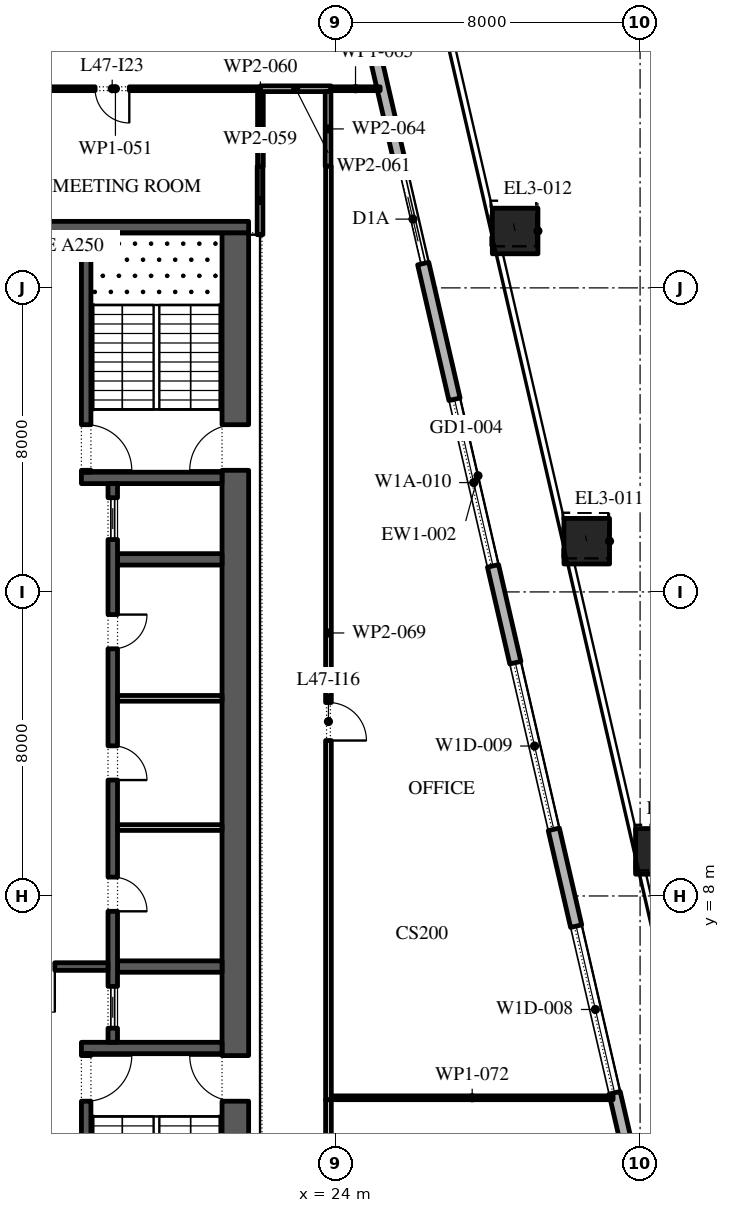
"""IFC4 building model, lengths in metres.
Left out: names, types, materials, properties, quantities, classifications, styles, units other than length and angle.
Written with IfcOpenShell. Run it as: python <this file> out.ifc"""

import sys

from ifc_helpers import new_model, si_unit, direction, frame, frame_2d, origin, origin_2d, place, context, subcontext, project, spatial, rectangle, extrude, element, fill, save


model = new_model("IFC4")
c1 = context("Model", 3, precision=1e-05, world=origin(), true_north=direction((0.0, 1.0)))
c2 = subcontext(c1, "Body", "Model", "MODEL_VIEW")
j1 = project(units=[si_unit("LENGTHUNIT", "METRE"), si_unit("PLANEANGLEUNIT", "RADIAN")], contexts=[c1])
p1 = place(None, origin())
s1 = spatial("IfcSite", under=j1, at=p1, CompositionType="ELEMENT")
p2 = place(p1, origin())
s2 = spatial("IfcBuilding", under=s1, at=p2, CompositionType="ELEMENT")
p3 = place(p2, frame((0.0, 0.0, 213.6)))
s3 = spatial("IfcBuildingStorey", under=s2, at=p3, CompositionType="ELEMENT", Elevation=213.6)
p4 = place(p3, frame((32.481, 9.174, 0.0), z_axis=(-0.005404479485, 0.023361298418, 0.999712479335), x_axis=(-0.974268511785, -0.225390476607, 0.0)))
e1 = element("IfcColumn", 1, at=p4, inside=s3, PredefinedType="COLUMN", context=c2, shape_type="SweptSolid", body=[
    extrude(rectangle(XDim=1.2, YDim=1.2, at=origin_2d()), origin(), (0.0, 0.0, 1.0), 4.201),
])
p5 = place(p3, frame((30.596, 17.335, 0.0), z_axis=(-0.0080747472, 0.035087390713, 0.999351626541), x_axis=(-0.974526982896, -0.224270282488, 0.0)))
e2 = element("IfcColumn", 2, at=p5, inside=s3, PredefinedType="COLUMN", context=c2, shape_type="SweptSolid", body=[
    extrude(rectangle(XDim=1.2, YDim=1.2, at=origin_2d()), origin(), (0.0, 0.0, 1.0), 4.203),
])
p6 = place(p3, frame((28.712, 25.497, 0.0), z_axis=(-0.010741563911, 0.046740318638, 0.998849318675), x_axis=(-0.974594841169, -0.223975211946, 0.0)))
e3 = element("IfcColumn", 3, at=p6, inside=s3, PredefinedType="COLUMN", context=c2, shape_type="SweptSolid", body=[
    extrude(rectangle(XDim=1.2, YDim=1.2, at=origin_2d()), origin(), (0.0, 0.0, 1.0), 4.205),
])
p7 = place(p3, frame((33.157, -5.092, 0.0), z_axis=(0.0, 0.0, 1.0), x_axis=(-0.224950279389, 0.974370243697, 0.0)))
e4 = element("IfcWall", 4, at=p7, inside=s3, PredefinedType="STANDARD", context=c2, shape_type="SweptSolid", body=[
    extrude(rectangle(XDim=49.5, YDim=0.3, at=frame_2d((24.75, 0.0))), origin(), (0.0, 0.0, 1.0), 4.0),
])
p8 = place(p7, frame((2.207, 0.0, 0.0)))
e5 = element("IfcOpeningElement", 5, at=p8, cuts=e4, PredefinedType="OPENING", context=c2, shape_type="SweptSolid", body=[
    extrude(rectangle(XDim=2.4, YDim=3.125, at=frame_2d((1.2, 1.562))), frame((0.0, 0.16, 0.0), z_axis=(0.0, -1.0, 0.0), x_axis=(1.0, 0.0, 0.0)), (0.0, 0.0, 1.0), 0.32),
])
p9 = place(p7, frame((8.121, 0.0, 0.45)))
e6 = element("IfcOpeningElement", 6, at=p9, cuts=e4, PredefinedType="OPENING", context=c2, shape_type="SweptSolid", body=[
    extrude(rectangle(XDim=4.5, YDim=2.875, at=frame_2d((2.25, 1.438))), frame((0.0, 0.16, 0.0), z_axis=(0.0, -1.0, 0.0), x_axis=(1.0, 0.0, 0.0)), (0.0, 0.0, 1.0), 0.32),
])
p10 = place(p7, frame((15.236, 0.0, 0.45)))
e7 = element("IfcOpeningElement", 7, at=p10, cuts=e4, PredefinedType="OPENING", context=c2, shape_type="SweptSolid", body=[
    extrude(rectangle(XDim=4.5, YDim=2.875, at=frame_2d((2.25, 1.438))), frame((0.0, 0.16, 0.0), z_axis=(0.0, -1.0, 0.0), x_axis=(1.0, 0.0, 0.0)), (0.0, 0.0, 1.0), 0.32),
])
p11 = place(p7, frame((22.35, 0.0, 0.45)))
e8 = element("IfcOpeningElement", 8, at=p11, cuts=e4, PredefinedType="OPENING", context=c2, shape_type="SweptSolid", body=[
    extrude(rectangle(XDim=4.5, YDim=3.0, at=frame_2d((2.25, 1.5))), frame((0.0, 0.16, 0.0), z_axis=(0.0, -1.0, 0.0), x_axis=(1.0, 0.0, 0.0)), (0.0, 0.0, 1.0), 0.32),
])
p12 = place(p7, frame((30.514, 0.0, 0.0)))
e9 = element("IfcOpeningElement", 9, at=p12, cuts=e4, PredefinedType="OPENING", context=c2, shape_type="SweptSolid", body=[
    extrude(rectangle(XDim=2.4, YDim=3.45, at=frame_2d((1.2, 1.725))), frame((0.0, 0.16, 0.0), z_axis=(0.0, -1.0, 0.0), x_axis=(1.0, 0.0, 0.0)), (0.0, 0.0, 1.0), 0.32),
])
p13 = place(p7, frame((36.579, 0.0, 0.45)))
e10 = element("IfcOpeningElement", 10, at=p13, cuts=e4, PredefinedType="OPENING", context=c2, shape_type="SweptSolid", body=[
    extrude(rectangle(XDim=4.5, YDim=3.05, at=frame_2d((2.25, 1.525))), frame((0.0, 0.16, 0.0), z_axis=(0.0, -1.0, 0.0), x_axis=(1.0, 0.0, 0.0)), (0.0, 0.0, 1.0), 0.32),
])
p14 = place(p7, frame((43.693, 0.0, 0.45)))
e11 = element("IfcOpeningElement", 11, at=p14, cuts=e4, PredefinedType="OPENING", context=c2, shape_type="SweptSolid", body=[
    extrude(rectangle(XDim=4.5, YDim=3.05, at=frame_2d((2.25, 1.525))), frame((0.0, 0.16, 0.0), z_axis=(0.0, -1.0, 0.0), x_axis=(1.0, 0.0, 0.0)), (0.0, 0.0, 1.0), 0.32),
])
p15 = place(p3, frame((21.35, -2.45, 0.0), z_axis=(0.0, 0.0, 1.0), x_axis=(0.0, 1.0, 0.0)))
e12 = element("IfcWall", 12, at=p15, inside=s3, PredefinedType="SHEAR", context=c2, shape_type="SweptSolid", body=[
    extrude(rectangle(XDim=27.9, YDim=0.7, at=frame_2d((13.95, 0.0))), origin(), (0.0, 0.0, 1.0), 4.0),
])
p16 = place(p15, frame((5.05, 0.0, 0.0)))
e13 = element("IfcOpeningElement", 13, at=p16, cuts=e12, PredefinedType="OPENING", context=c2, shape_type="SweptSolid", body=[
    extrude(rectangle(XDim=1.2, YDim=2.1, at=frame_2d((0.6, 1.05))), frame((0.0, 0.36, 0.0), z_axis=(0.0, -1.0, 0.0), x_axis=(1.0, 0.0, 0.0)), (0.0, 0.0, 1.0), 0.72),
])
p17 = place(p15, frame((21.65, 0.0, 0.0)))
e14 = element("IfcOpeningElement", 14, at=p17, cuts=e12, PredefinedType="OPENING", context=c2, shape_type="SweptSolid", body=[
    extrude(rectangle(XDim=1.2, YDim=2.1, at=frame_2d((0.6, 1.05))), frame((0.0, 0.36, 0.0), z_axis=(0.0, -1.0, 0.0), x_axis=(1.0, 0.0, 0.0)), (0.0, 0.0, 1.0), 0.72),
])
p18 = place(p3, frame((10.3, 25.6, 0.0), z_axis=(0.0, 0.0, 1.0), x_axis=(1.0, 0.0, 0.0)))
e15 = element("IfcWall", 15, at=p18, inside=s3, PredefinedType="SHEAR", context=c2, shape_type="SweptSolid", body=[
    extrude(rectangle(XDim=11.4, YDim=0.3, at=frame_2d((5.7, 0.0))), origin(), (0.0, 0.0, 1.0), 4.0),
])
p19 = place(p3, frame((17.3, 4.0, 0.0), z_axis=(0.0, 0.0, 1.0), x_axis=(1.0, 0.0, 0.0)))
e16 = element("IfcWall", 16, at=p19, inside=s3, PredefinedType="SHEAR", context=c2, shape_type="SweptSolid", body=[
    extrude(rectangle(XDim=3.7, YDim=0.3, at=frame_2d((1.85, 0.0))), origin(), (0.0, 0.0, 1.0), 4.0),
])
p20 = place(p3, frame((17.425, -2.45, 0.0), z_axis=(0.0, 0.0, 1.0), x_axis=(0.0, 1.0, 0.0)))
e17 = element("IfcWall", 17, at=p20, inside=s3, PredefinedType="SHEAR", context=c2, shape_type="SweptSolid", body=[
    extrude(rectangle(XDim=6.3, YDim=0.25, at=frame_2d((3.15, 0.0))), origin(), (0.0, 0.0, 1.0), 4.0),
])
p21 = place(p20, frame((5.05, 0.0, 0.0)))
e18 = element("IfcOpeningElement", 18, at=p21, cuts=e17, PredefinedType="OPENING", context=c2, shape_type="SweptSolid", body=[
    extrude(rectangle(XDim=1.2, YDim=2.1, at=frame_2d((0.6, 1.05))), frame((0.0, 0.135, 0.0), z_axis=(0.0, -1.0, 0.0), x_axis=(1.0, 0.0, 0.0)), (0.0, 0.0, 1.0), 0.27),
])
p22 = place(p3, frame((17.3, 19.0, 0.0), z_axis=(0.0, 0.0, 1.0), x_axis=(1.0, 0.0, 0.0)))
e19 = element("IfcWall", 19, at=p22, inside=s3, PredefinedType="SHEAR", context=c2, shape_type="SweptSolid", body=[
    extrude(rectangle(XDim=3.7, YDim=0.3, at=frame_2d((1.85, 0.0))), origin(), (0.0, 0.0, 1.0), 4.0),
])
p23 = place(p3, frame((17.425, 19.15, 0.0), z_axis=(0.0, 0.0, 1.0), x_axis=(0.0, 1.0, 0.0)))
e20 = element("IfcWall", 20, at=p23, inside=s3, PredefinedType="SHEAR", context=c2, shape_type="SweptSolid", body=[
    extrude(rectangle(XDim=6.3, YDim=0.25, at=frame_2d((3.15, 0.0))), origin(), (0.0, 0.0, 1.0), 4.0),
])
p24 = place(p23, frame((0.05, 0.0, 0.0)))
e21 = element("IfcOpeningElement", 21, at=p24, cuts=e20, PredefinedType="OPENING", context=c2, shape_type="SweptSolid", body=[
    extrude(rectangle(XDim=1.2, YDim=2.1, at=frame_2d((0.6, 1.05))), frame((0.0, 0.135, 0.0), z_axis=(0.0, -1.0, 0.0), x_axis=(1.0, 0.0, 0.0)), (0.0, 0.0, 1.0), 0.27),
])
for number, where, z_axis, x_axis in (
    (22, (18.25, 6.143, 0.0), (0.0, 0.0, 1.0), (1.0, 0.0, 0.0)),
    (23, (18.25, 16.857, 0.0), (0.0, 0.0, 1.0), (1.0, 0.0, 0.0)),
):
    element("IfcWall", number, at=place(p3, frame(where, z_axis=z_axis, x_axis=x_axis)), inside=s3, PredefinedType="SHEAR", context=c2, shape_type="SweptSolid", body=[
        extrude(rectangle(XDim=2.75, YDim=0.3, at=frame_2d((1.375, 0.0))), origin(), (0.0, 0.0, 1.0), 4.0),
    ])
p25 = place(p3, frame((18.125, 4.15, 0.0), z_axis=(0.0, 0.0, 1.0), x_axis=(0.0, 1.0, 0.0)))
e24 = element("IfcWall", 24, at=p25, inside=s3, PredefinedType="SHEAR", context=c2, shape_type="SweptSolid", body=[
    extrude(rectangle(XDim=14.7, YDim=0.25, at=frame_2d((7.35, 0.0))), origin(), (0.0, 0.0, 1.0), 4.0),
])
p26 = place(p25, frame((3.446, 0.0, 0.0)))
e25 = element("IfcOpeningElement", 25, at=p26, cuts=e24, PredefinedType="OPENING", context=c2, shape_type="SweptSolid", body=[
    extrude(rectangle(XDim=0.9, YDim=2.1, at=frame_2d((0.45, 1.05))), frame((0.0, 0.135, 0.0), z_axis=(0.0, -1.0, 0.0), x_axis=(1.0, 0.0, 0.0)), (0.0, 0.0, 1.0), 0.27),
])
p27 = place(p25, frame((6.9, 0.0, 0.0)))
e26 = element("IfcOpeningElement", 26, at=p27, cuts=e24, PredefinedType="OPENING", context=c2, shape_type="SweptSolid", body=[
    extrude(rectangle(XDim=0.9, YDim=2.1, at=frame_2d((0.45, 1.05))), frame((0.0, 0.135, 0.0), z_axis=(0.0, -1.0, 0.0), x_axis=(1.0, 0.0, 0.0)), (0.0, 0.0, 1.0), 0.27),
])
p28 = place(p25, frame((10.354, 0.0, 0.0)))
e27 = element("IfcOpeningElement", 27, at=p28, cuts=e24, PredefinedType="OPENING", context=c2, shape_type="SweptSolid", body=[
    extrude(rectangle(XDim=0.9, YDim=2.1, at=frame_2d((0.45, 1.05))), frame((0.0, 0.135, 0.0), z_axis=(0.0, -1.0, 0.0), x_axis=(1.0, 0.0, 0.0)), (0.0, 0.0, 1.0), 0.27),
])
p29 = place(p25, frame((0.371, 0.0, 0.0)))
e28 = element("IfcOpeningElement", 28, at=p29, cuts=e24, PredefinedType="OPENING", context=c2, shape_type="SweptSolid", body=[
    extrude(rectangle(XDim=1.1, YDim=2.1, at=frame_2d((0.55, 1.05))), frame((0.0, 0.135, 0.0), z_axis=(0.0, -1.0, 0.0), x_axis=(1.0, 0.0, 0.0)), (0.0, 0.0, 1.0), 0.27),
])
p30 = place(p25, frame((13.229, 0.0, 0.0)))
e29 = element("IfcOpeningElement", 29, at=p30, cuts=e24, PredefinedType="OPENING", context=c2, shape_type="SweptSolid", body=[
    extrude(rectangle(XDim=1.1, YDim=2.1, at=frame_2d((0.55, 1.05))), frame((0.0, 0.135, 0.0), z_axis=(0.0, -1.0, 0.0), x_axis=(1.0, 0.0, 0.0)), (0.0, 0.0, 1.0), 0.27),
])
for number, where, z_axis, x_axis in (
    (30, (18.25, 9.8, 0.0), (0.0, 0.0, 1.0), (1.0, 0.0, 0.0)),
    (31, (18.25, 13.2, 0.0), (0.0, 0.0, 1.0), (1.0, 0.0, 0.0)),
):
    element("IfcWall", number, at=place(p3, frame(where, z_axis=z_axis, x_axis=x_axis)), inside=s3, PredefinedType="PARTITIONING", context=c2, shape_type="SweptSolid", body=[
        extrude(rectangle(XDim=2.75, YDim=0.15, at=frame_2d((1.375, 0.0))), origin(), (0.0, 0.0, 1.0), 4.0),
    ])
p31 = place(p3, frame((14.0, 6.143, 0.0), z_axis=(0.0, 0.0, 1.0), x_axis=(1.0, 0.0, 0.0)))
e32 = element("IfcWall", 32, at=p31, inside=s3, PredefinedType="SHEAR", context=c2, shape_type="SweptSolid", body=[
    extrude(rectangle(XDim=4.0, YDim=0.2, at=frame_2d((2.0, 0.0))), origin(), (0.0, 0.0, 1.0), 4.0),
])
p32 = place(p31, frame((1.4, 0.0, 0.0)))
e33 = element("IfcOpeningElement", 33, at=p32, cuts=e32, PredefinedType="OPENING", context=c2, shape_type="SweptSolid", body=[
    extrude(rectangle(XDim=1.2, YDim=2.1, at=frame_2d((0.6, 1.05))), frame((0.0, 0.11, 0.0), z_axis=(0.0, -1.0, 0.0), x_axis=(1.0, 0.0, 0.0)), (0.0, 0.0, 1.0), 0.22),
])
p33 = place(p3, frame((14.38, 29.24, 0.0), z_axis=(0.0, 0.0, 1.0), x_axis=(1.0, 0.0, 0.0)))
e34 = element("IfcWall", 34, at=p33, inside=s3, PredefinedType="PARTITIONING", context=c2, shape_type="SweptSolid", body=[
    extrude(rectangle(XDim=7.63, YDim=0.1, at=frame_2d((3.815, 0.0))), origin(), (0.0, 0.0, 1.0), 4.0),
])
p34 = place(p33, frame((3.28, 0.0, 0.0)))
e35 = element("IfcOpeningElement", 35, at=p34, cuts=e34, PredefinedType="OPENING", context=c2, shape_type="SweptSolid", body=[
    extrude(rectangle(XDim=0.9, YDim=2.1, at=frame_2d((0.45, 1.05))), frame((0.0, 0.06, 0.0), z_axis=(0.0, -1.0, 0.0), x_axis=(1.0, 0.0, 0.0)), (0.0, 0.0, 1.0), 0.12),
])
p35 = place(p3, frame((22.0, 25.4, 0.0), z_axis=(0.0, 0.0, 1.0), x_axis=(0.0, 1.0, 0.0)))
e36 = element("IfcWall", 36, at=p35, inside=s3, PredefinedType="PARTITIONING", context=c2, shape_type="SweptSolid", body=[
    extrude(rectangle(XDim=1.8, YDim=0.15, at=frame_2d((0.9, 0.0))), origin(), (0.0, 0.0, 1.0), 4.0),
])
p36 = place(p3, frame((22.01, 27.2, 0.0), z_axis=(0.0, 0.0, 1.0), x_axis=(0.0, 1.0, 0.0)))
e37 = element("IfcWall", 37, at=p36, inside=s3, PredefinedType="PARTITIONING", context=c2, shape_type="SweptSolid", body=[
    extrude(rectangle(XDim=1.99, YDim=0.15, at=frame_2d((0.995, 0.0))), origin(), (0.0, 0.0, 1.0), 4.0),
])
p37 = place(p3, frame((22.01, 29.24, 0.0), z_axis=(0.0, 0.0, 1.0), x_axis=(1.0, 0.0, 0.0)))
e38 = element("IfcWall", 38, at=p37, inside=s3, PredefinedType="PARTITIONING", context=c2, shape_type="SweptSolid", body=[
    extrude(rectangle(XDim=1.855, YDim=0.15, at=frame_2d((0.927, 0.0))), origin(), (0.0, 0.0, 1.0), 4.0),
])
p38 = place(p3, frame((23.79, 29.165, 0.0), z_axis=(0.0, 0.0, 1.0), x_axis=(0.0, -1.0, 0.0)))
e39 = element("IfcWall", 39, at=p38, inside=s3, PredefinedType="PARTITIONING", context=c2, shape_type="SweptSolid", body=[
    extrude(rectangle(XDim=1.965, YDim=0.15, at=frame_2d((0.982, 0.0))), origin(), (0.0, 0.0, 1.0), 4.0),
])
p39 = place(p3, frame((23.865, 29.24, 0.0), z_axis=(0.0, 0.0, 1.0), x_axis=(1.0, 0.0, 0.0)))
e40 = element("IfcWall", 40, at=p39, inside=s3, PredefinedType="PARTITIONING", context=c2, shape_type="SweptSolid", body=[
    extrude(rectangle(XDim=1.295, YDim=0.1, at=frame_2d((0.647, 0.0))), origin(), (0.0, 0.0, 1.0), 4.0),
])
p40 = place(p3, frame((23.8, 2.64, 0.0), z_axis=(0.0, 0.0, 1.0), x_axis=(0.0, -1.0, 0.0)))
e41 = element("IfcWall", 41, at=p40, inside=s3, PredefinedType="PARTITIONING", context=c2, shape_type="SweptSolid", body=[
    extrude(rectangle(XDim=6.93, YDim=0.15, at=frame_2d((3.465, 0.0))), origin(), (0.0, 0.0, 1.0), 4.0),
])
p41 = place(p40, frame((2.98, 0.0, 0.0)))
e42 = element("IfcOpeningElement", 42, at=p41, cuts=e41, PredefinedType="OPENING", context=c2, shape_type="SweptSolid", body=[
    extrude(rectangle(XDim=1.0, YDim=2.1, at=frame_2d((0.5, 1.05))), frame((0.0, 0.085, 0.0), z_axis=(0.0, -1.0, 0.0), x_axis=(1.0, 0.0, 0.0)), (0.0, 0.0, 1.0), 0.17),
])
p42 = place(p3, frame((23.8, 27.2, 0.0), z_axis=(0.0, 0.0, 1.0), x_axis=(0.0, -1.0, 0.0)))
e43 = element("IfcWall", 43, at=p42, inside=s3, PredefinedType="PARTITIONING", context=c2, shape_type="SweptSolid", body=[
    extrude(rectangle(XDim=24.56, YDim=0.15, at=frame_2d((12.28, 0.0))), origin(), (0.0, 0.0, 1.0), 4.0),
])
p43 = place(p42, frame((14.11, 0.0, 0.0)))
e44 = element("IfcOpeningElement", 44, at=p43, cuts=e43, PredefinedType="OPENING", context=c2, shape_type="SweptSolid", body=[
    extrude(rectangle(XDim=1.0, YDim=2.1, at=frame_2d((0.5, 1.05))), frame((0.0, 0.085, 0.0), z_axis=(0.0, -1.0, 0.0), x_axis=(1.0, 0.0, 0.0)), (0.0, 0.0, 1.0), 0.17),
])
p44 = place(p3, frame((31.289, 2.69, 0.0), z_axis=(0.0, 0.0, 1.0), x_axis=(-1.0, 0.0, 0.0)))
e45 = element("IfcWall", 45, at=p44, inside=s3, PredefinedType="PARTITIONING", context=c2, shape_type="SweptSolid", body=[
    extrude(rectangle(XDim=7.414, YDim=0.1, at=frame_2d((3.707, 0.0))), origin(), (0.0, 0.0, 1.0), 4.0),
])
p45 = place(p9, origin())
e46 = element("IfcWindow", 46, at=p45, inside=s3, PartitioningType="DOUBLE_PANEL_VERTICAL", PredefinedType="WINDOW", context=c2, shape_type="SweptSolid", body=[
    extrude(rectangle(XDim=4.5, YDim=2.875, at=frame_2d((2.25, 1.438))), frame((0.0, 0.03, 0.0), z_axis=(0.0, -1.0, 0.0), x_axis=(1.0, 0.0, 0.0)), (0.0, 0.0, 1.0), 0.06),
])
fill(e6, e46)
p46 = place(p10, origin())
e47 = element("IfcWindow", 47, at=p46, inside=s3, PartitioningType="DOUBLE_PANEL_VERTICAL", PredefinedType="WINDOW", context=c2, shape_type="SweptSolid", body=[
    extrude(rectangle(XDim=4.5, YDim=2.875, at=frame_2d((2.25, 1.438))), frame((0.0, 0.03, 0.0), z_axis=(0.0, -1.0, 0.0), x_axis=(1.0, 0.0, 0.0)), (0.0, 0.0, 1.0), 0.06),
])
fill(e7, e47)
p47 = place(p11, origin())
e48 = element("IfcWindow", 48, at=p47, inside=s3, PartitioningType="DOUBLE_PANEL_VERTICAL", PredefinedType="WINDOW", context=c2, shape_type="SweptSolid", body=[
    extrude(rectangle(XDim=4.5, YDim=3.0, at=frame_2d((2.25, 1.5))), frame((0.0, 0.03, 0.0), z_axis=(0.0, -1.0, 0.0), x_axis=(1.0, 0.0, 0.0)), (0.0, 0.0, 1.0), 0.06),
])
fill(e8, e48)
p48 = place(p12, origin())
e49 = element("IfcDoor", 49, at=p48, inside=s3, OperationType="DOUBLE_DOOR_SLIDING", PredefinedType="DOOR", context=c2, shape_type="SweptSolid", body=[
    extrude(rectangle(XDim=2.4, YDim=3.45, at=frame_2d((1.2, 1.725))), frame((0.0, 0.025, 0.0), z_axis=(0.0, -1.0, 0.0), x_axis=(1.0, 0.0, 0.0)), (0.0, 0.0, 1.0), 0.05),
])
fill(e9, e49)
p49 = place(p26, frame((0.9, -0.2, 0.0), z_axis=(0.0, 0.0, 1.0), x_axis=(-1.0, 0.0, 0.0)))
e50 = element("IfcDoor", 50, at=p49, inside=s3, OperationType="SINGLE_SWING_LEFT", PredefinedType="DOOR", context=c2, shape_type="SweptSolid", body=[
    extrude(rectangle(XDim=0.9, YDim=2.1, at=frame_2d((0.45, 1.05))), frame((0.0, -0.075, 0.0), z_axis=(0.0, -1.0, 0.0), x_axis=(1.0, 0.0, 0.0)), (0.0, 0.0, 1.0), 0.05),
])
fill(e25, e50)
p50 = place(p27, frame((0.9, -0.2, 0.0), z_axis=(0.0, 0.0, 1.0), x_axis=(-1.0, 0.0, 0.0)))
e51 = element("IfcDoor", 51, at=p50, inside=s3, OperationType="SINGLE_SWING_LEFT", PredefinedType="DOOR", context=c2, shape_type="SweptSolid", body=[
    extrude(rectangle(XDim=0.9, YDim=2.1, at=frame_2d((0.45, 1.05))), frame((0.0, -0.075, 0.0), z_axis=(0.0, -1.0, 0.0), x_axis=(1.0, 0.0, 0.0)), (0.0, 0.0, 1.0), 0.05),
])
fill(e26, e51)
p51 = place(p28, frame((0.9, -0.2, 0.0), z_axis=(0.0, 0.0, 1.0), x_axis=(-1.0, 0.0, 0.0)))
e52 = element("IfcDoor", 52, at=p51, inside=s3, OperationType="SINGLE_SWING_RIGHT", PredefinedType="DOOR", context=c2, shape_type="SweptSolid", body=[
    extrude(rectangle(XDim=0.9, YDim=2.1, at=frame_2d((0.45, 1.05))), frame((0.0, -0.075, 0.0), z_axis=(0.0, -1.0, 0.0), x_axis=(1.0, 0.0, 0.0)), (0.0, 0.0, 1.0), 0.05),
])
fill(e27, e52)
p52 = place(p29, origin())
e53 = element("IfcDoor", 53, at=p52, inside=s3, OperationType="SLIDING_TO_LEFT", PredefinedType="DOOR", context=c2, shape_type="SweptSolid", body=[
    extrude(rectangle(XDim=1.1, YDim=2.1, at=frame_2d((0.55, 1.05))), frame((0.0, 0.025, 0.0), z_axis=(0.0, -1.0, 0.0), x_axis=(1.0, 0.0, 0.0)), (0.0, 0.0, 1.0), 0.05),
])
fill(e28, e53)
p53 = place(p30, origin())
e54 = element("IfcDoor", 54, at=p53, inside=s3, OperationType="SLIDING_TO_LEFT", PredefinedType="DOOR", context=c2, shape_type="SweptSolid", body=[
    extrude(rectangle(XDim=1.1, YDim=2.1, at=frame_2d((0.55, 1.05))), frame((0.0, 0.025, 0.0), z_axis=(0.0, -1.0, 0.0), x_axis=(1.0, 0.0, 0.0)), (0.0, 0.0, 1.0), 0.05),
])
fill(e29, e54)
p54 = place(p32, frame((1.2, 0.0, 0.0), z_axis=(0.0, 0.0, 1.0), x_axis=(-1.0, 0.0, 0.0)))
e55 = element("IfcDoor", 55, at=p54, inside=s3, OperationType="SINGLE_SWING_RIGHT", PredefinedType="DOOR", context=c2, shape_type="SweptSolid", body=[
    extrude(rectangle(XDim=1.2, YDim=2.1, at=frame_2d((0.6, 1.05))), frame((0.0, 0.025, 0.0), z_axis=(0.0, -1.0, 0.0), x_axis=(1.0, 0.0, 0.0)), (0.0, 0.0, 1.0), 0.05),
])
fill(e33, e55)
p55 = place(p21, frame((1.2, 0.0, 0.0), z_axis=(0.0, 0.0, 1.0), x_axis=(-1.0, 0.0, 0.0)))
e56 = element("IfcDoor", 56, at=p55, inside=s3, OperationType="SINGLE_SWING_RIGHT", PredefinedType="DOOR", context=c2, shape_type="SweptSolid", body=[
    extrude(rectangle(XDim=1.2, YDim=2.1, at=frame_2d((0.6, 1.05))), frame((0.0, 0.025, 0.0), z_axis=(0.0, -1.0, 0.0), x_axis=(1.0, 0.0, 0.0)), (0.0, 0.0, 1.0), 0.05),
])
fill(e18, e56)
p56 = place(p16, origin())
e57 = element("IfcDoor", 57, at=p56, inside=s3, OperationType="SINGLE_SWING_LEFT", PredefinedType="DOOR", context=c2, shape_type="SweptSolid", body=[
    extrude(rectangle(XDim=1.2, YDim=2.1, at=frame_2d((0.6, 1.05))), frame((0.0, 0.025, 0.0), z_axis=(0.0, -1.0, 0.0), x_axis=(1.0, 0.0, 0.0)), (0.0, 0.0, 1.0), 0.05),
])
fill(e13, e57)
p57 = place(p24, frame((1.2, 0.0, 0.0), z_axis=(0.0, 0.0, 1.0), x_axis=(-1.0, 0.0, 0.0)))
e58 = element("IfcDoor", 58, at=p57, inside=s3, OperationType="SINGLE_SWING_LEFT", PredefinedType="DOOR", context=c2, shape_type="SweptSolid", body=[
    extrude(rectangle(XDim=1.2, YDim=2.1, at=frame_2d((0.6, 1.05))), frame((0.0, 0.025, 0.0), z_axis=(0.0, -1.0, 0.0), x_axis=(1.0, 0.0, 0.0)), (0.0, 0.0, 1.0), 0.05),
])
fill(e21, e58)
p58 = place(p17, origin())
e59 = element("IfcDoor", 59, at=p58, inside=s3, OperationType="SINGLE_SWING_RIGHT", PredefinedType="DOOR", context=c2, shape_type="SweptSolid", body=[
    extrude(rectangle(XDim=1.2, YDim=2.1, at=frame_2d((0.6, 1.05))), frame((0.0, 0.025, 0.0), z_axis=(0.0, -1.0, 0.0), x_axis=(1.0, 0.0, 0.0)), (0.0, 0.0, 1.0), 0.05),
])
fill(e14, e59)
p59 = place(p43, origin())
e60 = element("IfcDoor", 60, at=p59, inside=s3, OperationType="SINGLE_SWING_LEFT", PredefinedType="DOOR", context=c2, shape_type="SweptSolid", body=[
    extrude(rectangle(XDim=1.0, YDim=2.1, at=frame_2d((0.5, 1.05))), frame((0.0, 0.025, 0.0), z_axis=(0.0, -1.0, 0.0), x_axis=(1.0, 0.0, 0.0)), (0.0, 0.0, 1.0), 0.05),
])
fill(e44, e60)
p60 = place(p34, frame((0.9, 0.0, 0.0), z_axis=(0.0, 0.0, 1.0), x_axis=(-1.0, 0.0, 0.0)))
e61 = element("IfcDoor", 61, at=p60, inside=s3, OperationType="SINGLE_SWING_RIGHT", PredefinedType="DOOR", context=c2, shape_type="SweptSolid", body=[
    extrude(rectangle(XDim=0.9, YDim=2.1, at=frame_2d((0.45, 1.05))), frame((0.0, 0.025, 0.0), z_axis=(0.0, -1.0, 0.0), x_axis=(1.0, 0.0, 0.0)), (0.0, 0.0, 1.0), 0.05),
])
fill(e35, e61)
save(model, sys.argv[1])
